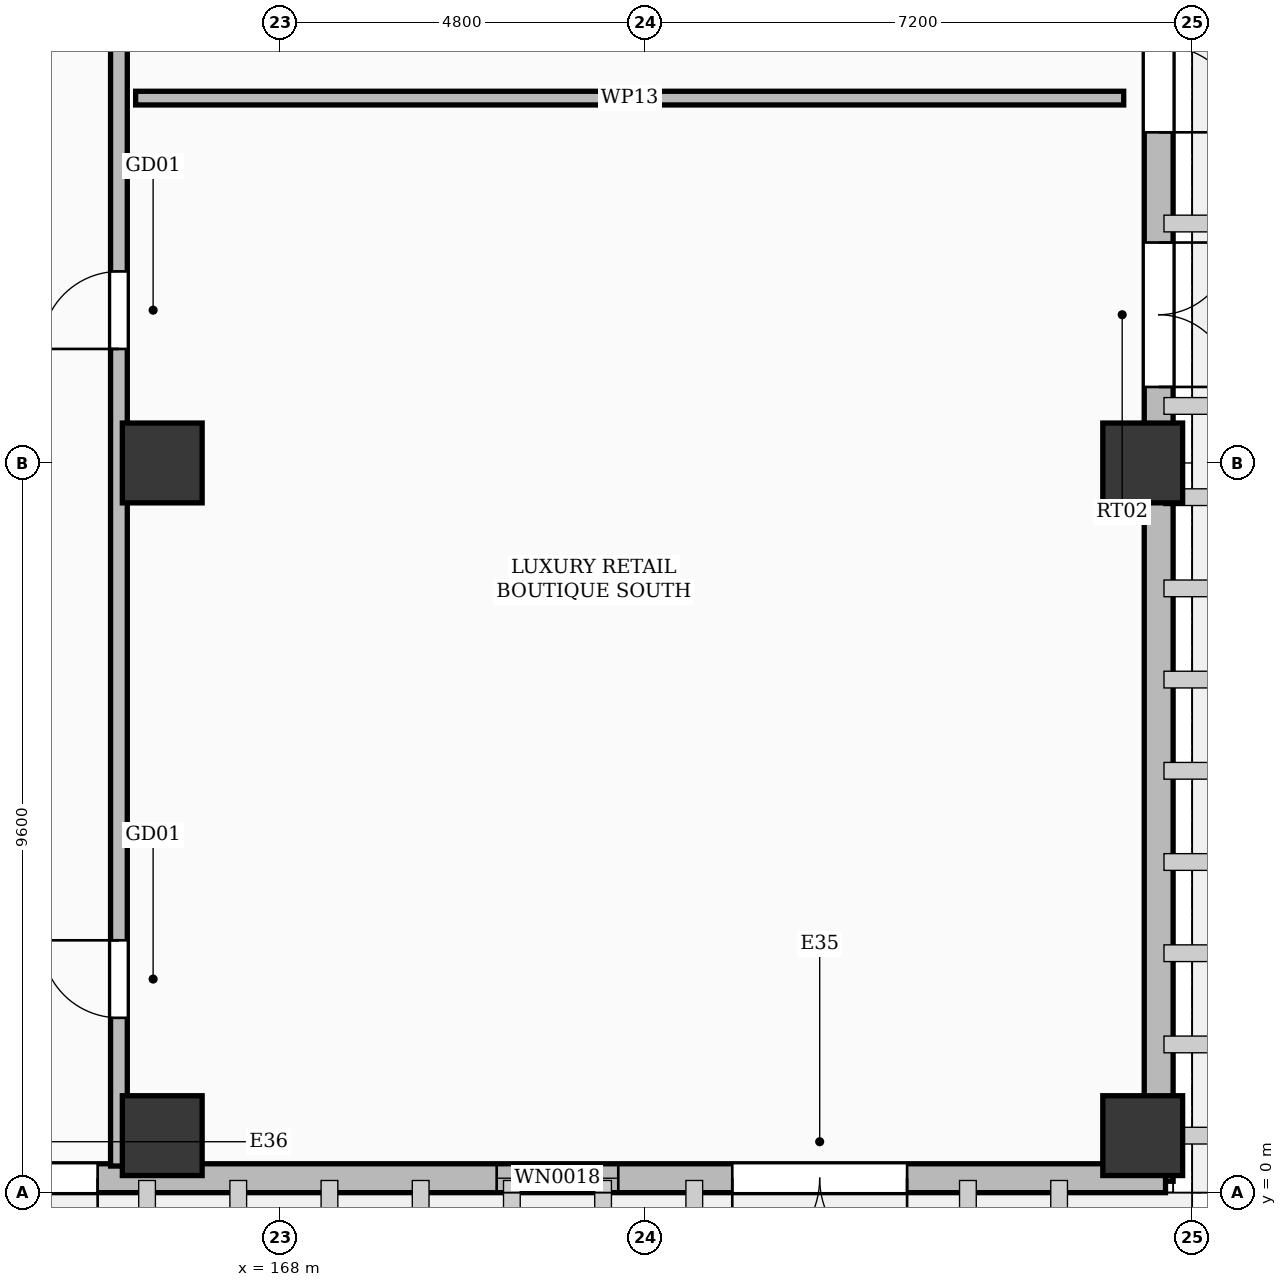
"""IFC4 building model, lengths in metres.
Left out: names, types, materials, properties, quantities, classifications, styles, units other than length and angle.
Written with IfcOpenShell. Run it as: python <this file> out.ifc"""

import sys

from ifc_helpers import new_model, si_unit, direction, frame, frame_2d, origin, origin_2d, place, context, subcontext, project, spatial, rectangle, extrude, element, fill, save


model = new_model("IFC4")
c1 = context("Model", 3, precision=1e-05, world=origin(), true_north=direction((0.0, 1.0)))
c2 = subcontext(c1, "Body", "Model", "MODEL_VIEW")
j1 = project(units=[si_unit("LENGTHUNIT", "METRE"), si_unit("PLANEANGLEUNIT", "RADIAN")], contexts=[c1])
p1 = place(None, origin())
s1 = spatial("IfcSite", under=j1, at=p1, CompositionType="ELEMENT")
p2 = place(p1, origin())
s2 = spatial("IfcBuilding", under=s1, at=p2, CompositionType="ELEMENT")
p3 = place(p2, origin())
s3 = spatial("IfcBuildingStorey", under=s2, at=p3, CompositionType="ELEMENT", Elevation=0.0)
for number, where, z_axis, x_axis in (
    (1, (166.45, 0.75, 0.0), (0.0, 0.0, 1.0), (1.0, 0.0, 0.0)),
    (2, (166.45, 9.6, 0.0), (0.0, 0.0, 1.0), (1.0, 0.0, 0.0)),
    (3, (179.35, 0.75, 0.0), (0.0, 0.0, 1.0), (1.0, 0.0, 0.0)),
    (4, (179.35, 9.6, 0.0), (0.0, 0.0, 1.0), (1.0, 0.0, 0.0)),
):
    element("IfcColumn", number, at=place(p3, frame(where, z_axis=z_axis, x_axis=x_axis)), inside=s3, PredefinedType="COLUMN", context=c2, shape_type="SweptSolid", body=[
        extrude(rectangle(XDim=1.05, YDim=1.05, at=origin_2d()), origin(), (0.0, 0.0, 1.0), 6.0),
    ])
p4 = place(p3, frame((179.56, 125.85, 0.0), z_axis=(0.0, 0.0, 1.0), x_axis=(0.0, -1.0, 0.0)))
e5 = element("IfcWall", 5, at=p4, inside=s3, PredefinedType="SOLIDWALL", context=c2, shape_type="SweptSolid", body=[
    extrude(rectangle(XDim=125.7, YDim=0.38, at=frame_2d((62.85, 0.0))), origin(), (0.0, 0.0, 1.0), 4.692),
])
p5 = place(p4, frame((4.0, 0.0, 0.0)))
e6 = element("IfcOpeningElement", 6, at=p5, cuts=e5, PredefinedType="OPENING", context=c2, shape_type="SweptSolid", body=[
    extrude(rectangle(XDim=2.3, YDim=2.4, at=frame_2d((1.15, 1.2))), frame((0.0, 0.202, 0.0), z_axis=(0.0, -1.0, 0.0), x_axis=(1.0, 0.0, 0.0)), (0.0, 0.0, 1.0), 0.404),
])
p6 = place(p4, frame((13.6, 0.0, 0.0)))
e7 = element("IfcOpeningElement", 7, at=p6, cuts=e5, PredefinedType="OPENING", context=c2, shape_type="SweptSolid", body=[
    extrude(rectangle(XDim=2.3, YDim=2.4, at=frame_2d((1.15, 1.2))), frame((0.0, 0.202, 0.0), z_axis=(0.0, -1.0, 0.0), x_axis=(1.0, 0.0, 0.0)), (0.0, 0.0, 1.0), 0.404),
])
p7 = place(p4, frame((23.2, 0.0, 0.0)))
e8 = element("IfcOpeningElement", 8, at=p7, cuts=e5, PredefinedType="OPENING", context=c2, shape_type="SweptSolid", body=[
    extrude(rectangle(XDim=2.3, YDim=2.4, at=frame_2d((1.15, 1.2))), frame((0.0, 0.202, 0.0), z_axis=(0.0, -1.0, 0.0), x_axis=(1.0, 0.0, 0.0)), (0.0, 0.0, 1.0), 0.404),
])
p8 = place(p4, frame((32.8, 0.0, 0.0)))
e9 = element("IfcOpeningElement", 9, at=p8, cuts=e5, PredefinedType="OPENING", context=c2, shape_type="SweptSolid", body=[
    extrude(rectangle(XDim=2.3, YDim=2.4, at=frame_2d((1.15, 1.2))), frame((0.0, 0.202, 0.0), z_axis=(0.0, -1.0, 0.0), x_axis=(1.0, 0.0, 0.0)), (0.0, 0.0, 1.0), 0.404),
])
p9 = place(p4, frame((42.4, 0.0, 0.0)))
e10 = element("IfcOpeningElement", 10, at=p9, cuts=e5, PredefinedType="OPENING", context=c2, shape_type="SweptSolid", body=[
    extrude(rectangle(XDim=2.3, YDim=2.4, at=frame_2d((1.15, 1.2))), frame((0.0, 0.202, 0.0), z_axis=(0.0, -1.0, 0.0), x_axis=(1.0, 0.0, 0.0)), (0.0, 0.0, 1.0), 0.404),
])
p10 = place(p4, frame((52.0, 0.0, 0.0)))
e11 = element("IfcOpeningElement", 11, at=p10, cuts=e5, PredefinedType="OPENING", context=c2, shape_type="SweptSolid", body=[
    extrude(rectangle(XDim=2.3, YDim=2.4, at=frame_2d((1.15, 1.2))), frame((0.0, 0.202, 0.0), z_axis=(0.0, -1.0, 0.0), x_axis=(1.0, 0.0, 0.0)), (0.0, 0.0, 1.0), 0.404),
])
p11 = place(p4, frame((61.6, 0.0, 0.0)))
e12 = element("IfcOpeningElement", 12, at=p11, cuts=e5, PredefinedType="OPENING", context=c2, shape_type="SweptSolid", body=[
    extrude(rectangle(XDim=2.3, YDim=2.4, at=frame_2d((1.15, 1.2))), frame((0.0, 0.202, 0.0), z_axis=(0.0, -1.0, 0.0), x_axis=(1.0, 0.0, 0.0)), (0.0, 0.0, 1.0), 0.404),
])
p12 = place(p4, frame((71.2, 0.0, 0.0)))
e13 = element("IfcOpeningElement", 13, at=p12, cuts=e5, PredefinedType="OPENING", context=c2, shape_type="SweptSolid", body=[
    extrude(rectangle(XDim=2.3, YDim=2.4, at=frame_2d((1.15, 1.2))), frame((0.0, 0.202, 0.0), z_axis=(0.0, -1.0, 0.0), x_axis=(1.0, 0.0, 0.0)), (0.0, 0.0, 1.0), 0.404),
])
p13 = place(p4, frame((80.8, 0.0, 0.0)))
e14 = element("IfcOpeningElement", 14, at=p13, cuts=e5, PredefinedType="OPENING", context=c2, shape_type="SweptSolid", body=[
    extrude(rectangle(XDim=2.3, YDim=2.4, at=frame_2d((1.15, 1.2))), frame((0.0, 0.202, 0.0), z_axis=(0.0, -1.0, 0.0), x_axis=(1.0, 0.0, 0.0)), (0.0, 0.0, 1.0), 0.404),
])
p14 = place(p4, frame((90.4, 0.0, 0.0)))
e15 = element("IfcOpeningElement", 15, at=p14, cuts=e5, PredefinedType="OPENING", context=c2, shape_type="SweptSolid", body=[
    extrude(rectangle(XDim=2.3, YDim=2.4, at=frame_2d((1.15, 1.2))), frame((0.0, 0.202, 0.0), z_axis=(0.0, -1.0, 0.0), x_axis=(1.0, 0.0, 0.0)), (0.0, 0.0, 1.0), 0.404),
])
p15 = place(p4, frame((100.0, 0.0, 0.0)))
e16 = element("IfcOpeningElement", 16, at=p15, cuts=e5, PredefinedType="OPENING", context=c2, shape_type="SweptSolid", body=[
    extrude(rectangle(XDim=2.3, YDim=2.4, at=frame_2d((1.15, 1.2))), frame((0.0, 0.202, 0.0), z_axis=(0.0, -1.0, 0.0), x_axis=(1.0, 0.0, 0.0)), (0.0, 0.0, 1.0), 0.404),
])
p16 = place(p4, frame((109.6, 0.0, 0.0)))
e17 = element("IfcOpeningElement", 17, at=p16, cuts=e5, PredefinedType="OPENING", context=c2, shape_type="SweptSolid", body=[
    extrude(rectangle(XDim=2.3, YDim=2.4, at=frame_2d((1.15, 1.2))), frame((0.0, 0.202, 0.0), z_axis=(0.0, -1.0, 0.0), x_axis=(1.0, 0.0, 0.0)), (0.0, 0.0, 1.0), 0.404),
])
p17 = place(p4, frame((94.15, 0.0, 0.0)))
e18 = element("IfcOpeningElement", 18, at=p17, cuts=e5, PredefinedType="OPENING", context=c2, shape_type="SweptSolid", body=[
    extrude(rectangle(XDim=1.9, YDim=2.45, at=frame_2d((0.95, 1.225))), frame((0.0, 0.202, 0.0), z_axis=(0.0, -1.0, 0.0), x_axis=(1.0, 0.0, 0.0)), (0.0, 0.0, 1.0), 0.404),
])
p18 = place(p4, frame((113.35, 0.0, 0.0)))
e19 = element("IfcOpeningElement", 19, at=p18, cuts=e5, PredefinedType="OPENING", context=c2, shape_type="SweptSolid", body=[
    extrude(rectangle(XDim=1.9, YDim=2.45, at=frame_2d((0.95, 1.225))), frame((0.0, 0.202, 0.0), z_axis=(0.0, -1.0, 0.0), x_axis=(1.0, 0.0, 0.0)), (0.0, 0.0, 1.0), 0.404),
])
p19 = place(p3, frame((179.65, 0.19, 0.0), z_axis=(0.0, 0.0, 1.0), x_axis=(-1.0, 0.0, 0.0)))
e20 = element("IfcWall", 20, at=p19, inside=s3, PredefinedType="SOLIDWALL", context=c2, shape_type="SweptSolid", body=[
    extrude(rectangle(XDim=121.9, YDim=0.38, at=frame_2d((60.95, 0.0))), origin(), (0.0, 0.0, 1.0), 5.142),
])
p20 = place(p19, frame((3.4, 0.0, 0.0)))
e21 = element("IfcOpeningElement", 21, at=p20, cuts=e20, PredefinedType="OPENING", context=c2, shape_type="SweptSolid", body=[
    extrude(rectangle(XDim=2.3, YDim=2.4, at=frame_2d((1.15, 1.2))), frame((0.0, 0.202, 0.0), z_axis=(0.0, -1.0, 0.0), x_axis=(1.0, 0.0, 0.0)), (0.0, 0.0, 1.0), 0.404),
])
p21 = place(p19, frame((14.05, 0.0, 0.0)))
e22 = element("IfcOpeningElement", 22, at=p21, cuts=e20, PredefinedType="OPENING", context=c2, shape_type="SweptSolid", body=[
    extrude(rectangle(XDim=2.3, YDim=2.4, at=frame_2d((1.15, 1.2))), frame((0.0, 0.202, 0.0), z_axis=(0.0, -1.0, 0.0), x_axis=(1.0, 0.0, 0.0)), (0.0, 0.0, 1.0), 0.404),
])
p22 = place(p19, frame((22.6, 0.0, 0.0)))
e23 = element("IfcOpeningElement", 23, at=p22, cuts=e20, PredefinedType="OPENING", context=c2, shape_type="SweptSolid", body=[
    extrude(rectangle(XDim=2.3, YDim=2.4, at=frame_2d((1.15, 1.2))), frame((0.0, 0.202, 0.0), z_axis=(0.0, -1.0, 0.0), x_axis=(1.0, 0.0, 0.0)), (0.0, 0.0, 1.0), 0.404),
])
p23 = place(p19, frame((32.2, 0.0, 0.0)))
e24 = element("IfcOpeningElement", 24, at=p23, cuts=e20, PredefinedType="OPENING", context=c2, shape_type="SweptSolid", body=[
    extrude(rectangle(XDim=2.3, YDim=2.4, at=frame_2d((1.15, 1.2))), frame((0.0, 0.202, 0.0), z_axis=(0.0, -1.0, 0.0), x_axis=(1.0, 0.0, 0.0)), (0.0, 0.0, 1.0), 0.404),
])
p24 = place(p19, frame((41.8, 0.0, 0.0)))
e25 = element("IfcOpeningElement", 25, at=p24, cuts=e20, PredefinedType="OPENING", context=c2, shape_type="SweptSolid", body=[
    extrude(rectangle(XDim=2.3, YDim=2.4, at=frame_2d((1.15, 1.2))), frame((0.0, 0.202, 0.0), z_axis=(0.0, -1.0, 0.0), x_axis=(1.0, 0.0, 0.0)), (0.0, 0.0, 1.0), 0.404),
])
p25 = place(p19, frame((51.4, 0.0, 0.0)))
e26 = element("IfcOpeningElement", 26, at=p25, cuts=e20, PredefinedType="OPENING", context=c2, shape_type="SweptSolid", body=[
    extrude(rectangle(XDim=2.3, YDim=2.4, at=frame_2d((1.15, 1.2))), frame((0.0, 0.202, 0.0), z_axis=(0.0, -1.0, 0.0), x_axis=(1.0, 0.0, 0.0)), (0.0, 0.0, 1.0), 0.404),
])
p26 = place(p19, frame((61.0, 0.0, 0.0)))
e27 = element("IfcOpeningElement", 27, at=p26, cuts=e20, PredefinedType="OPENING", context=c2, shape_type="SweptSolid", body=[
    extrude(rectangle(XDim=2.3, YDim=2.4, at=frame_2d((1.15, 1.2))), frame((0.0, 0.202, 0.0), z_axis=(0.0, -1.0, 0.0), x_axis=(1.0, 0.0, 0.0)), (0.0, 0.0, 1.0), 0.404),
])
p27 = place(p19, frame((70.6, 0.0, 0.0)))
e28 = element("IfcOpeningElement", 28, at=p27, cuts=e20, PredefinedType="OPENING", context=c2, shape_type="SweptSolid", body=[
    extrude(rectangle(XDim=2.3, YDim=2.4, at=frame_2d((1.15, 1.2))), frame((0.0, 0.202, 0.0), z_axis=(0.0, -1.0, 0.0), x_axis=(1.0, 0.0, 0.0)), (0.0, 0.0, 1.0), 0.404),
])
p28 = place(p19, frame((80.2, 0.0, 0.0)))
e29 = element("IfcOpeningElement", 29, at=p28, cuts=e20, PredefinedType="OPENING", context=c2, shape_type="SweptSolid", body=[
    extrude(rectangle(XDim=2.3, YDim=2.4, at=frame_2d((1.15, 1.2))), frame((0.0, 0.202, 0.0), z_axis=(0.0, -1.0, 0.0), x_axis=(1.0, 0.0, 0.0)), (0.0, 0.0, 1.0), 0.404),
])
p29 = place(p19, frame((89.8, 0.0, 0.0)))
e30 = element("IfcOpeningElement", 30, at=p29, cuts=e20, PredefinedType="OPENING", context=c2, shape_type="SweptSolid", body=[
    extrude(rectangle(XDim=2.3, YDim=2.4, at=frame_2d((1.15, 1.2))), frame((0.0, 0.202, 0.0), z_axis=(0.0, -1.0, 0.0), x_axis=(1.0, 0.0, 0.0)), (0.0, 0.0, 1.0), 0.404),
])
p30 = place(p19, frame((99.4, 0.0, 0.0)))
e31 = element("IfcOpeningElement", 31, at=p30, cuts=e20, PredefinedType="OPENING", context=c2, shape_type="SweptSolid", body=[
    extrude(rectangle(XDim=2.3, YDim=2.4, at=frame_2d((1.15, 1.2))), frame((0.0, 0.202, 0.0), z_axis=(0.0, -1.0, 0.0), x_axis=(1.0, 0.0, 0.0)), (0.0, 0.0, 1.0), 0.404),
])
p31 = place(p19, frame((109.0, 0.0, 0.0)))
e32 = element("IfcOpeningElement", 32, at=p31, cuts=e20, PredefinedType="OPENING", context=c2, shape_type="SweptSolid", body=[
    extrude(rectangle(XDim=2.3, YDim=2.4, at=frame_2d((1.15, 1.2))), frame((0.0, 0.202, 0.0), z_axis=(0.0, -1.0, 0.0), x_axis=(1.0, 0.0, 0.0)), (0.0, 0.0, 1.0), 0.404),
])
p32 = place(p19, frame((7.2, 0.0, 0.8)))
e33 = element("IfcOpeningElement", 33, at=p32, cuts=e20, PredefinedType="OPENING", context=c2, shape_type="SweptSolid", body=[
    extrude(rectangle(XDim=1.6, YDim=2.8, at=frame_2d((0.8, 1.4))), frame((0.0, 0.202, 0.0), z_axis=(0.0, -1.0, 0.0), x_axis=(1.0, 0.0, 0.0)), (0.0, 0.0, 1.0), 0.404),
])
p33 = place(p19, frame((26.4, 0.0, 0.8)))
e34 = element("IfcOpeningElement", 34, at=p33, cuts=e20, PredefinedType="OPENING", context=c2, shape_type="SweptSolid", body=[
    extrude(rectangle(XDim=2.0, YDim=2.8, at=frame_2d((1.0, 1.4))), frame((0.0, 0.202, 0.0), z_axis=(0.0, -1.0, 0.0), x_axis=(1.0, 0.0, 0.0)), (0.0, 0.0, 1.0), 0.404),
])
p34 = place(p19, frame((45.95, 0.0, 0.8)))
e35 = element("IfcOpeningElement", 35, at=p34, cuts=e20, PredefinedType="OPENING", context=c2, shape_type="SweptSolid", body=[
    extrude(rectangle(XDim=2.4, YDim=3.0, at=frame_2d((1.2, 1.5))), frame((0.0, 0.202, 0.0), z_axis=(0.0, -1.0, 0.0), x_axis=(1.0, 0.0, 0.0)), (0.0, 0.0, 1.0), 0.404),
])
p35 = place(p19, frame((65.15, 0.0, 0.8)))
e36 = element("IfcOpeningElement", 36, at=p35, cuts=e20, PredefinedType="OPENING", context=c2, shape_type="SweptSolid", body=[
    extrude(rectangle(XDim=2.8, YDim=3.2, at=frame_2d((1.4, 1.6))), frame((0.0, 0.202, 0.0), z_axis=(0.0, -1.0, 0.0), x_axis=(1.0, 0.0, 0.0)), (0.0, 0.0, 1.0), 0.404),
])
p36 = place(p19, frame((84.35, 0.0, 0.8)))
e37 = element("IfcOpeningElement", 37, at=p36, cuts=e20, PredefinedType="OPENING", context=c2, shape_type="SweptSolid", body=[
    extrude(rectangle(XDim=1.4, YDim=2.5, at=frame_2d((0.7, 1.25))), frame((0.0, 0.202, 0.0), z_axis=(0.0, -1.0, 0.0), x_axis=(1.0, 0.0, 0.0)), (0.0, 0.0, 1.0), 0.404),
])
p37 = place(p3, frame((165.88, 0.35, 0.0), z_axis=(0.0, 0.0, 1.0), x_axis=(0.0, 1.0, 0.0)))
e38 = element("IfcWall", 38, at=p37, inside=s3, PredefinedType="PARTITIONING", context=c2, shape_type="SweptSolid", body=[
    extrude(rectangle(XDim=28.25, YDim=0.22, at=frame_2d((14.125, 0.0))), origin(), (0.0, 0.0, 1.0), 4.692),
])
p38 = place(p37, frame((1.95, 0.0, 0.0)))
e39 = element("IfcOpeningElement", 39, at=p38, cuts=e38, PredefinedType="OPENING", context=c2, shape_type="SweptSolid", body=[
    extrude(rectangle(XDim=1.02, YDim=2.2, at=frame_2d((0.51, 1.1))), frame((0.0, 0.122, 0.0), z_axis=(0.0, -1.0, 0.0), x_axis=(1.0, 0.0, 0.0)), (0.0, 0.0, 1.0), 0.244),
])
p39 = place(p37, frame((10.75, 0.0, 0.0)))
e40 = element("IfcOpeningElement", 40, at=p39, cuts=e38, PredefinedType="OPENING", context=c2, shape_type="SweptSolid", body=[
    extrude(rectangle(XDim=1.02, YDim=2.2, at=frame_2d((0.51, 1.1))), frame((0.0, 0.122, 0.0), z_axis=(0.0, -1.0, 0.0), x_axis=(1.0, 0.0, 0.0)), (0.0, 0.0, 1.0), 0.244),
])
p40 = place(p37, frame((15.55, 0.0, 0.0)))
e41 = element("IfcOpeningElement", 41, at=p40, cuts=e38, PredefinedType="OPENING", context=c2, shape_type="SweptSolid", body=[
    extrude(rectangle(XDim=1.02, YDim=2.2, at=frame_2d((0.51, 1.1))), frame((0.0, 0.122, 0.0), z_axis=(0.0, -1.0, 0.0), x_axis=(1.0, 0.0, 0.0)), (0.0, 0.0, 1.0), 0.244),
])
p41 = place(p37, frame((25.15, 0.0, 0.0)))
e42 = element("IfcOpeningElement", 42, at=p41, cuts=e38, PredefinedType="OPENING", context=c2, shape_type="SweptSolid", body=[
    extrude(rectangle(XDim=1.02, YDim=2.2, at=frame_2d((0.51, 1.1))), frame((0.0, 0.122, 0.0), z_axis=(0.0, -1.0, 0.0), x_axis=(1.0, 0.0, 0.0)), (0.0, 0.0, 1.0), 0.244),
])
p42 = place(p3, frame((166.1, 14.4, 0.0), z_axis=(0.0, 0.0, 1.0), x_axis=(1.0, 0.0, 0.0)))
e43 = element("IfcWall", 43, at=p42, inside=s3, PredefinedType="PARTITIONING", context=c2, shape_type="SweptSolid", body=[
    extrude(rectangle(XDim=13.0, YDim=0.18, at=frame_2d((6.5, 0.0))), origin(), (0.0, 0.0, 1.0), 4.692),
])
p43 = place(p16, origin())
e44 = element("IfcDoor", 44, at=p43, inside=s3, OperationType="DOUBLE_DOOR_SINGLE_SWING", PredefinedType="DOOR", context=c2, shape_type="SweptSolid", body=[
    extrude(rectangle(XDim=2.3, YDim=2.4, at=frame_2d((1.15, 1.2))), frame((0.0, 0.025, 0.0), z_axis=(0.0, -1.0, 0.0), x_axis=(1.0, 0.0, 0.0)), (0.0, 0.0, 1.0), 0.05),
])
fill(e17, e44)
p44 = place(p18, origin())
e45 = element("IfcDoor", 45, at=p44, inside=s3, OperationType="DOUBLE_DOOR_SINGLE_SWING", PredefinedType="DOOR", context=c2, shape_type="SweptSolid", body=[
    extrude(rectangle(XDim=1.9, YDim=2.45, at=frame_2d((0.95, 1.225))), frame((0.0, 0.025, 0.0), z_axis=(0.0, -1.0, 0.0), x_axis=(1.0, 0.0, 0.0)), (0.0, 0.0, 1.0), 0.05),
])
fill(e19, e45)
p45 = place(p20, origin())
e46 = element("IfcDoor", 46, at=p45, inside=s3, OperationType="DOUBLE_DOOR_SINGLE_SWING", PredefinedType="DOOR", context=c2, shape_type="SweptSolid", body=[
    extrude(rectangle(XDim=2.3, YDim=2.4, at=frame_2d((1.15, 1.2))), frame((0.0, 0.025, 0.0), z_axis=(0.0, -1.0, 0.0), x_axis=(1.0, 0.0, 0.0)), (0.0, 0.0, 1.0), 0.05),
])
fill(e21, e46)
p46 = place(p21, origin())
e47 = element("IfcDoor", 47, at=p46, inside=s3, OperationType="DOUBLE_DOOR_SINGLE_SWING", PredefinedType="DOOR", context=c2, shape_type="SweptSolid", body=[
    extrude(rectangle(XDim=2.3, YDim=2.4, at=frame_2d((1.15, 1.2))), frame((0.0, 0.025, 0.0), z_axis=(0.0, -1.0, 0.0), x_axis=(1.0, 0.0, 0.0)), (0.0, 0.0, 1.0), 0.05),
])
fill(e22, e47)
p47 = place(p32, origin())
e48 = element("IfcWindow", 48, at=p47, inside=s3, PartitioningType="SINGLE_PANEL", PredefinedType="WINDOW", context=c2, shape_type="SweptSolid", body=[
    extrude(rectangle(XDim=1.6, YDim=2.8, at=frame_2d((0.8, 1.4))), frame((0.0, 0.03, 0.0), z_axis=(0.0, -1.0, 0.0), x_axis=(1.0, 0.0, 0.0)), (0.0, 0.0, 1.0), 0.06),
])
fill(e33, e48)
p48 = place(p38, origin())
e49 = element("IfcDoor", 49, at=p48, inside=s3, OperationType="SINGLE_SWING_RIGHT", PredefinedType="DOOR", context=c2, shape_type="SweptSolid", body=[
    extrude(rectangle(XDim=1.02, YDim=2.2, at=frame_2d((0.51, 1.1))), frame((0.0, 0.025, 0.0), z_axis=(0.0, -1.0, 0.0), x_axis=(1.0, 0.0, 0.0)), (0.0, 0.0, 1.0), 0.05),
])
fill(e39, e49)
p49 = place(p39, origin())
e50 = element("IfcDoor", 50, at=p49, inside=s3, OperationType="SINGLE_SWING_LEFT", PredefinedType="DOOR", context=c2, shape_type="SweptSolid", body=[
    extrude(rectangle(XDim=1.02, YDim=2.2, at=frame_2d((0.51, 1.1))), frame((0.0, 0.025, 0.0), z_axis=(0.0, -1.0, 0.0), x_axis=(1.0, 0.0, 0.0)), (0.0, 0.0, 1.0), 0.05),
])
fill(e40, e50)
save(model, sys.argv[1])
